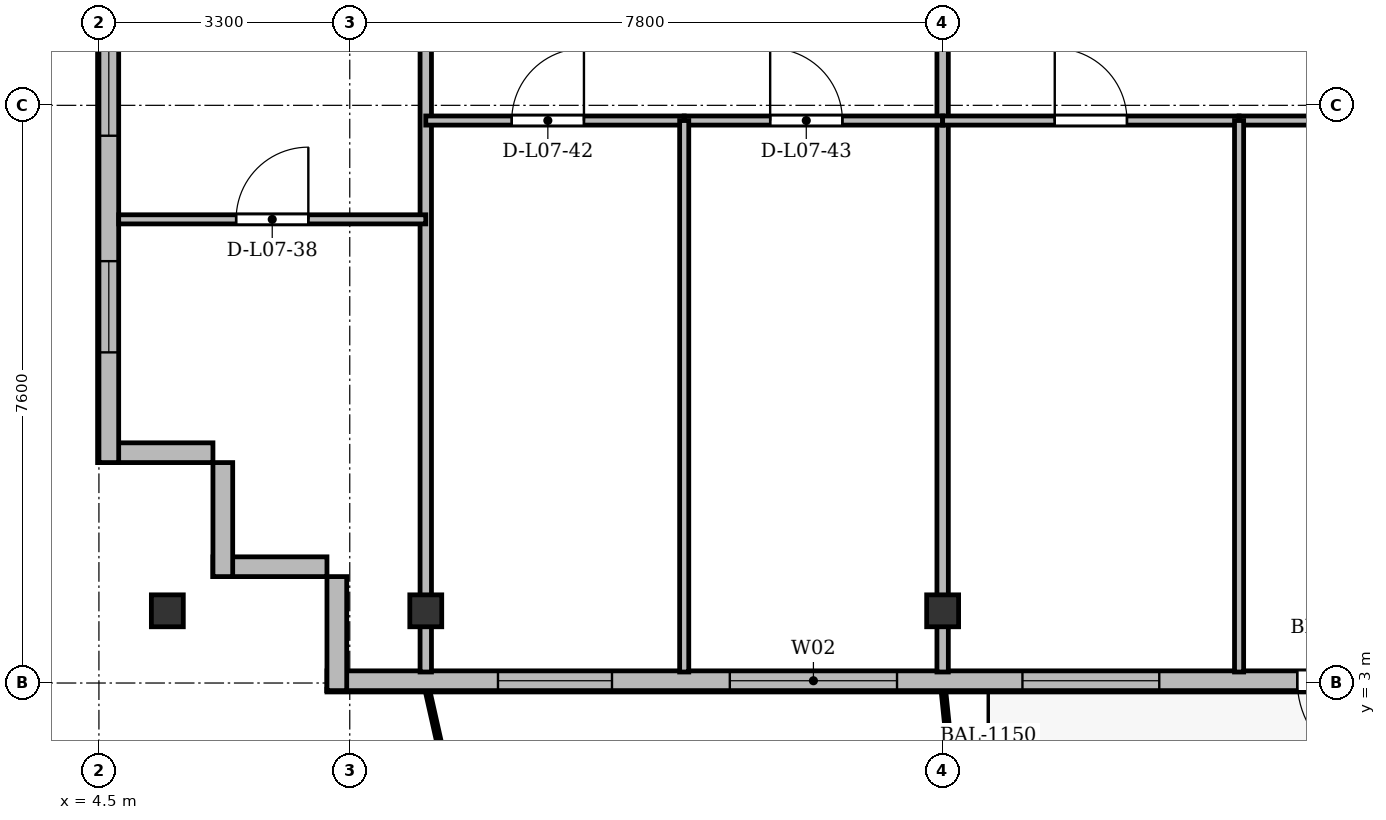
"""IFC4 building model, lengths in metres.
Left out: names, types, materials, properties, quantities, classifications, styles, units other than length and angle.
Written with IfcOpenShell. Run it as: python <this file> out.ifc"""

import sys

from ifc_helpers import new_model, si_unit, direction, frame, frame_2d, origin, origin_2d, place, context, subcontext, project, spatial, rectangle, i_section, extrude, source, transform, mapped, element, fill, save


model = new_model("IFC4")
c1 = context("Model", 3, precision=1e-05, world=origin(), true_north=direction((0.0, 1.0)))
c2 = subcontext(c1, "Body", "Model", "MODEL_VIEW")
j1 = project(units=[si_unit("LENGTHUNIT", "METRE"), si_unit("PLANEANGLEUNIT", "RADIAN")], contexts=[c1])
p1 = place(None, origin())
s1 = spatial("IfcSite", under=j1, at=p1, CompositionType="ELEMENT")
p2 = place(p1, origin())
s2 = spatial("IfcBuilding", under=s1, at=p2, CompositionType="ELEMENT")
p3 = place(p2, frame((0.0, 0.0, 30.7)))
s3 = spatial("IfcBuildingStorey", under=s2, at=p3, CompositionType="ELEMENT", Elevation=30.7)
m1 = source(origin(), c2, "Body", "SweptSolid", [
    extrude(i_section(OverallWidth=0.42, OverallDepth=0.42, WebThickness=0.026, FlangeThickness=0.04, at=origin_2d()), origin(), (0.0, 0.0, 1.0), 3.6),
])
for number, where, z_axis, x_axis in (
    (1, (5.4, 3.95, 0.0), (0.0, 0.0, 1.0), (1.0, 0.0, 0.0)),
    (2, (8.8, 3.95, 0.0), (0.0, 0.0, 1.0), (1.0, 0.0, 0.0)),
    (3, (15.6, 3.95, 0.0), (0.0, 0.0, 1.0), (1.0, 0.0, 0.0)),
):
    element("IfcColumn", number, at=place(p3, frame(where, z_axis=z_axis, x_axis=x_axis)), inside=s3, PredefinedType="COLUMN", context=c2, shape_type="MappedRepresentation", body=[
        mapped(m1, transform((0.0, 0.0, 0.0), x_axis=(1.0, 0.0, 0.0), y_axis=(0.0, 1.0, 0.0), z_axis=(0.0, 0.0, 1.0), scale=1.0)),
    ])
for number, where, z_axis, x_axis in (
    (4, (7.5, 4.53, 0.0), (0.0, 0.0, 1.0), (-1.0, 0.0, 0.0)),
    (5, (6.13, 4.4, 0.0), (0.0, 0.0, 1.0), (0.0, 1.0, 0.0)),
):
    element("IfcWall", number, at=place(p3, frame(where, z_axis=z_axis, x_axis=x_axis)), inside=s3, PredefinedType="SOLIDWALL", context=c2, shape_type="SweptSolid", body=[
        extrude(rectangle(XDim=1.5, YDim=0.26, at=frame_2d((0.75, 0.0))), origin(), (0.0, 0.0, 1.0), 3.34),
    ])
p4 = place(p3, frame((6.0, 6.03, 0.0), z_axis=(0.0, 0.0, 1.0), x_axis=(-1.0, 0.0, 0.0)))
e6 = element("IfcWall", 6, at=p4, inside=s3, PredefinedType="SOLIDWALL", context=c2, shape_type="SweptSolid", body=[
    extrude(rectangle(XDim=1.5, YDim=0.26, at=frame_2d((0.75, 0.0))), origin(), (0.0, 0.0, 1.0), 2.752),
])
p5 = place(p3, frame((4.63, 5.9, 0.0), z_axis=(0.0, 0.0, 1.0), x_axis=(0.0, 1.0, 0.0)))
e7 = element("IfcWall", 7, at=p5, inside=s3, PredefinedType="SOLIDWALL", context=c2, shape_type="SweptSolid", body=[
    extrude(rectangle(XDim=39.6, YDim=0.26, at=frame_2d((19.8, 0.0))), origin(), (0.0, 0.0, 1.0), 3.34),
])
p6 = place(p5, frame((1.45, 0.0, 0.92)))
e8 = element("IfcOpeningElement", 8, at=p6, cuts=e7, PredefinedType="OPENING", context=c2, shape_type="SweptSolid", body=[
    extrude(rectangle(XDim=1.2, YDim=1.65, at=frame_2d((0.6, 0.825))), frame((0.0, 0.14, 0.0), z_axis=(0.0, -1.0, 0.0), x_axis=(1.0, 0.0, 0.0)), (0.0, 0.0, 1.0), 0.28),
])
p7 = place(p5, frame((4.3, 0.0, 0.92)))
e9 = element("IfcOpeningElement", 9, at=p7, cuts=e7, PredefinedType="OPENING", context=c2, shape_type="SweptSolid", body=[
    extrude(rectangle(XDim=2.4, YDim=2.1, at=frame_2d((1.2, 1.05))), frame((0.0, 0.14, 0.0), z_axis=(0.0, -1.0, 0.0), x_axis=(1.0, 0.0, 0.0)), (0.0, 0.0, 1.0), 0.28),
])
p8 = place(p5, frame((8.5, 0.0, 0.92)))
e10 = element("IfcOpeningElement", 10, at=p8, cuts=e7, PredefinedType="OPENING", context=c2, shape_type="SweptSolid", body=[
    extrude(rectangle(XDim=2.4, YDim=2.1, at=frame_2d((1.2, 1.05))), frame((0.0, 0.14, 0.0), z_axis=(0.0, -1.0, 0.0), x_axis=(1.0, 0.0, 0.0)), (0.0, 0.0, 1.0), 0.28),
])
p9 = place(p5, frame((33.9, 0.0, 0.92)))
e11 = element("IfcOpeningElement", 11, at=p9, cuts=e7, PredefinedType="OPENING", context=c2, shape_type="SweptSolid", body=[
    extrude(rectangle(XDim=1.2, YDim=1.65, at=frame_2d((0.6, 0.825))), frame((0.0, 0.14, 0.0), z_axis=(0.0, -1.0, 0.0), x_axis=(1.0, 0.0, 0.0)), (0.0, 0.0, 1.0), 0.28),
])
p10 = place(p5, frame((37.25, 0.0, 0.92)))
e12 = element("IfcOpeningElement", 12, at=p10, cuts=e7, PredefinedType="OPENING", context=c2, shape_type="SweptSolid", body=[
    extrude(rectangle(XDim=1.2, YDim=1.65, at=frame_2d((0.6, 0.825))), frame((0.0, 0.14, 0.0), z_axis=(0.0, -1.0, 0.0), x_axis=(1.0, 0.0, 0.0)), (0.0, 0.0, 1.0), 0.28),
])
p11 = place(p3, frame((66.9, 3.03, 0.0), z_axis=(0.0, 0.0, 1.0), x_axis=(-1.0, 0.0, 0.0)))
e13 = element("IfcWall", 13, at=p11, inside=s3, PredefinedType="SOLIDWALL", context=c2, shape_type="SweptSolid", body=[
    extrude(rectangle(XDim=59.4, YDim=0.26, at=frame_2d((29.7, 0.0))), origin(), (0.0, 0.0, 1.0), 3.34),
])
p12 = place(p11, frame((3.7, 0.0, 0.9)))
e14 = element("IfcOpeningElement", 14, at=p12, cuts=e13, PredefinedType="OPENING", context=c2, shape_type="SweptSolid", body=[
    extrude(rectangle(XDim=2.0, YDim=1.95, at=frame_2d((1.0, 0.975))), frame((0.0, 0.14, 0.0), z_axis=(0.0, -1.0, 0.0), x_axis=(1.0, 0.0, 0.0)), (0.0, 0.0, 1.0), 0.28),
])
p13 = place(p11, frame((9.225, 0.0, 0.9)))
e15 = element("IfcOpeningElement", 15, at=p13, cuts=e13, PredefinedType="OPENING", context=c2, shape_type="SweptSolid", body=[
    extrude(rectangle(XDim=1.65, YDim=1.85, at=frame_2d((0.825, 0.925))), frame((0.0, 0.14, 0.0), z_axis=(0.0, -1.0, 0.0), x_axis=(1.0, 0.0, 0.0)), (0.0, 0.0, 1.0), 0.28),
])
p14 = place(p11, frame((13.05, 0.0, 0.9)))
e16 = element("IfcOpeningElement", 16, at=p14, cuts=e13, PredefinedType="OPENING", context=c2, shape_type="SweptSolid", body=[
    extrude(rectangle(XDim=1.8, YDim=1.8, at=frame_2d((0.9, 0.9))), frame((0.0, 0.14, 0.0), z_axis=(0.0, -1.0, 0.0), x_axis=(1.0, 0.0, 0.0)), (0.0, 0.0, 1.0), 0.28),
])
p15 = place(p11, frame((17.007, 0.0, 0.0)))
e17 = element("IfcOpeningElement", 17, at=p15, cuts=e13, PredefinedType="OPENING", context=c2, shape_type="SweptSolid", body=[
    extrude(rectangle(XDim=1.2, YDim=2.2, at=frame_2d((0.6, 1.1))), frame((0.0, 0.14, 0.0), z_axis=(0.0, -1.0, 0.0), x_axis=(1.0, 0.0, 0.0)), (0.0, 0.0, 1.0), 0.28),
])
p16 = place(p11, frame((20.55, 0.0, 0.9)))
e18 = element("IfcOpeningElement", 18, at=p16, cuts=e13, PredefinedType="OPENING", context=c2, shape_type="SweptSolid", body=[
    extrude(rectangle(XDim=1.5, YDim=1.75, at=frame_2d((0.75, 0.875))), frame((0.0, 0.14, 0.0), z_axis=(0.0, -1.0, 0.0), x_axis=(1.0, 0.0, 0.0)), (0.0, 0.0, 1.0), 0.28),
])
p17 = place(p11, frame((23.75, 0.0, 0.9)))
e19 = element("IfcOpeningElement", 19, at=p17, cuts=e13, PredefinedType="OPENING", context=c2, shape_type="SweptSolid", body=[
    extrude(rectangle(XDim=2.0, YDim=1.95, at=frame_2d((1.0, 0.975))), frame((0.0, 0.14, 0.0), z_axis=(0.0, -1.0, 0.0), x_axis=(1.0, 0.0, 0.0)), (0.0, 0.0, 1.0), 0.28),
])
p18 = place(p11, frame((27.225, 0.0, 0.9)))
e20 = element("IfcOpeningElement", 20, at=p18, cuts=e13, PredefinedType="OPENING", context=c2, shape_type="SweptSolid", body=[
    extrude(rectangle(XDim=1.65, YDim=1.85, at=frame_2d((0.825, 0.925))), frame((0.0, 0.14, 0.0), z_axis=(0.0, -1.0, 0.0), x_axis=(1.0, 0.0, 0.0)), (0.0, 0.0, 1.0), 0.28),
])
p19 = place(p11, frame((32.1, 0.0, 0.9)))
e21 = element("IfcOpeningElement", 21, at=p19, cuts=e13, PredefinedType="OPENING", context=c2, shape_type="SweptSolid", body=[
    extrude(rectangle(XDim=1.8, YDim=1.8, at=frame_2d((0.9, 0.9))), frame((0.0, 0.14, 0.0), z_axis=(0.0, -1.0, 0.0), x_axis=(1.0, 0.0, 0.0)), (0.0, 0.0, 1.0), 0.28),
])
p20 = place(p11, frame((36.75, 0.0, 0.9)))
e22 = element("IfcOpeningElement", 22, at=p20, cuts=e13, PredefinedType="OPENING", context=c2, shape_type="SweptSolid", body=[
    extrude(rectangle(XDim=1.5, YDim=1.75, at=frame_2d((0.75, 0.875))), frame((0.0, 0.14, 0.0), z_axis=(0.0, -1.0, 0.0), x_axis=(1.0, 0.0, 0.0)), (0.0, 0.0, 1.0), 0.28),
])
p21 = place(p11, frame((39.15, 0.0, 0.9)))
e23 = element("IfcOpeningElement", 23, at=p21, cuts=e13, PredefinedType="OPENING", context=c2, shape_type="SweptSolid", body=[
    extrude(rectangle(XDim=1.5, YDim=1.75, at=frame_2d((0.75, 0.875))), frame((0.0, 0.14, 0.0), z_axis=(0.0, -1.0, 0.0), x_axis=(1.0, 0.0, 0.0)), (0.0, 0.0, 1.0), 0.28),
])
p22 = place(p11, frame((41.3, 0.0, 0.9)))
e24 = element("IfcOpeningElement", 24, at=p22, cuts=e13, PredefinedType="OPENING", context=c2, shape_type="SweptSolid", body=[
    extrude(rectangle(XDim=2.0, YDim=1.95, at=frame_2d((1.0, 0.975))), frame((0.0, 0.14, 0.0), z_axis=(0.0, -1.0, 0.0), x_axis=(1.0, 0.0, 0.0)), (0.0, 0.0, 1.0), 0.28),
])
p23 = place(p11, frame((45.435, 0.0, 0.0)))
e25 = element("IfcOpeningElement", 25, at=p23, cuts=e13, PredefinedType="OPENING", context=c2, shape_type="SweptSolid", body=[
    extrude(rectangle(XDim=1.2, YDim=2.2, at=frame_2d((0.6, 1.1))), frame((0.0, 0.14, 0.0), z_axis=(0.0, -1.0, 0.0), x_axis=(1.0, 0.0, 0.0)), (0.0, 0.0, 1.0), 0.28),
])
p24 = place(p11, frame((48.45, 0.0, 0.9)))
e26 = element("IfcOpeningElement", 26, at=p24, cuts=e13, PredefinedType="OPENING", context=c2, shape_type="SweptSolid", body=[
    extrude(rectangle(XDim=1.8, YDim=1.8, at=frame_2d((0.9, 0.9))), frame((0.0, 0.14, 0.0), z_axis=(0.0, -1.0, 0.0), x_axis=(1.0, 0.0, 0.0)), (0.0, 0.0, 1.0), 0.28),
])
p25 = place(p11, frame((51.9, 0.0, 0.9)))
e27 = element("IfcOpeningElement", 27, at=p25, cuts=e13, PredefinedType="OPENING", context=c2, shape_type="SweptSolid", body=[
    extrude(rectangle(XDim=2.2, YDim=1.8, at=frame_2d((1.1, 0.9))), frame((0.0, 0.14, 0.0), z_axis=(0.0, -1.0, 0.0), x_axis=(1.0, 0.0, 0.0)), (0.0, 0.0, 1.0), 0.28),
])
p26 = place(p11, frame((55.65, 0.0, 0.9)))
e28 = element("IfcOpeningElement", 28, at=p26, cuts=e13, PredefinedType="OPENING", context=c2, shape_type="SweptSolid", body=[
    extrude(rectangle(XDim=1.5, YDim=1.75, at=frame_2d((0.75, 0.875))), frame((0.0, 0.14, 0.0), z_axis=(0.0, -1.0, 0.0), x_axis=(1.0, 0.0, 0.0)), (0.0, 0.0, 1.0), 0.28),
])
p27 = place(p3, frame((7.63, 2.9, 0.0), z_axis=(0.0, 0.0, 1.0), x_axis=(0.0, 1.0, 0.0)))
e29 = element("IfcWall", 29, at=p27, inside=s3, PredefinedType="SOLIDWALL", context=c2, shape_type="SweptSolid", body=[
    extrude(rectangle(XDim=1.5, YDim=0.26, at=frame_2d((0.75, 0.0))), origin(), (0.0, 0.0, 1.0), 2.69),
])
for number, where, z_axis, x_axis in (
    (30, (8.8, 3.145, 0.0), (0.0, 0.0, 1.0), (0.0, 1.0, 0.0)),
    (31, (15.6, 3.145, 0.0), (0.0, 0.0, 1.0), (0.0, 1.0, 0.0)),
):
    element("IfcWall", number, at=place(p3, frame(where, z_axis=z_axis, x_axis=x_axis)), inside=s3, PredefinedType="PARTITIONING", context=c2, shape_type="SweptSolid", body=[
        extrude(rectangle(XDim=24.455, YDim=0.15, at=frame_2d((12.228, 0.0))), origin(), (0.0, 0.0, 1.0), 2.752),
    ])
p28 = place(p3, frame((4.76, 9.1, 0.0), z_axis=(0.0, 0.0, 1.0), x_axis=(1.0, 0.0, 0.0)))
e32 = element("IfcWall", 32, at=p28, inside=s3, PredefinedType="PARTITIONING", context=c2, shape_type="SweptSolid", body=[
    extrude(rectangle(XDim=4.04, YDim=0.12, at=frame_2d((2.02, 0.0))), origin(), (0.0, 0.0, 1.0), 2.752),
])
p29 = place(p28, frame((1.545, 0.0, 0.0)))
e33 = element("IfcOpeningElement", 33, at=p29, cuts=e32, PredefinedType="OPENING", context=c2, shape_type="SweptSolid", body=[
    extrude(rectangle(XDim=0.95, YDim=2.15, at=frame_2d((0.475, 1.075))), frame((0.0, 0.07, 0.0), z_axis=(0.0, -1.0, 0.0), x_axis=(1.0, 0.0, 0.0)), (0.0, 0.0, 1.0), 0.14),
])
p30 = place(p3, frame((8.8, 10.4, 0.0), z_axis=(0.0, 0.0, 1.0), x_axis=(1.0, 0.0, 0.0)))
e34 = element("IfcWall", 34, at=p30, inside=s3, PredefinedType="PARTITIONING", context=c2, shape_type="SweptSolid", body=[
    extrude(rectangle(XDim=3.4, YDim=0.12, at=frame_2d((1.7, 0.0))), origin(), (0.0, 0.0, 1.0), 2.752),
])
p31 = place(p30, frame((1.131, 0.0, 0.0)))
e35 = element("IfcOpeningElement", 35, at=p31, cuts=e34, PredefinedType="OPENING", context=c2, shape_type="SweptSolid", body=[
    extrude(rectangle(XDim=0.95, YDim=2.15, at=frame_2d((0.475, 1.075))), frame((0.0, 0.07, 0.0), z_axis=(0.0, -1.0, 0.0), x_axis=(1.0, 0.0, 0.0)), (0.0, 0.0, 1.0), 0.14),
])
p32 = place(p3, frame((12.2, 10.4, 0.0), z_axis=(0.0, 0.0, 1.0), x_axis=(1.0, 0.0, 0.0)))
e36 = element("IfcWall", 36, at=p32, inside=s3, PredefinedType="PARTITIONING", context=c2, shape_type="SweptSolid", body=[
    extrude(rectangle(XDim=3.4, YDim=0.12, at=frame_2d((1.7, 0.0))), origin(), (0.0, 0.0, 1.0), 2.752),
])
p33 = place(p32, frame((1.131, 0.0, 0.0)))
e37 = element("IfcOpeningElement", 37, at=p33, cuts=e36, PredefinedType="OPENING", context=c2, shape_type="SweptSolid", body=[
    extrude(rectangle(XDim=0.95, YDim=2.15, at=frame_2d((0.475, 1.075))), frame((0.0, 0.07, 0.0), z_axis=(0.0, -1.0, 0.0), x_axis=(1.0, 0.0, 0.0)), (0.0, 0.0, 1.0), 0.14),
])
p34 = place(p3, frame((12.2, 3.145, 0.0), z_axis=(0.0, 0.0, 1.0), x_axis=(0.0, 1.0, 0.0)))
e38 = element("IfcWall", 38, at=p34, inside=s3, PredefinedType="PARTITIONING", context=c2, shape_type="SweptSolid", body=[
    extrude(rectangle(XDim=7.255, YDim=0.12, at=frame_2d((3.627, 0.0))), origin(), (0.0, 0.0, 1.0), 2.69),
])
p35 = place(p3, frame((15.6, 10.4, 0.0), z_axis=(0.0, 0.0, 1.0), x_axis=(1.0, 0.0, 0.0)))
e39 = element("IfcWall", 39, at=p35, inside=s3, PredefinedType="PARTITIONING", context=c2, shape_type="SweptSolid", body=[
    extrude(rectangle(XDim=3.9, YDim=0.12, at=frame_2d((1.95, 0.0))), origin(), (0.0, 0.0, 1.0), 2.752),
])
p36 = place(p35, frame((1.475, 0.0, 0.0)))
e40 = element("IfcOpeningElement", 40, at=p36, cuts=e39, PredefinedType="OPENING", context=c2, shape_type="SweptSolid", body=[
    extrude(rectangle(XDim=0.95, YDim=2.15, at=frame_2d((0.475, 1.075))), frame((0.0, 0.07, 0.0), z_axis=(0.0, -1.0, 0.0), x_axis=(1.0, 0.0, 0.0)), (0.0, 0.0, 1.0), 0.14),
])
p37 = place(p3, frame((19.5, 10.4, 0.0), z_axis=(0.0, 0.0, 1.0), x_axis=(1.0, 0.0, 0.0)))
e41 = element("IfcWall", 41, at=p37, inside=s3, PredefinedType="PARTITIONING", context=c2, shape_type="SweptSolid", body=[
    extrude(rectangle(XDim=3.9, YDim=0.12, at=frame_2d((1.95, 0.0))), origin(), (0.0, 0.0, 1.0), 2.752),
])
p38 = place(p37, frame((1.475, 0.0, 0.0)))
e42 = element("IfcOpeningElement", 42, at=p38, cuts=e41, PredefinedType="OPENING", context=c2, shape_type="SweptSolid", body=[
    extrude(rectangle(XDim=0.95, YDim=2.15, at=frame_2d((0.475, 1.075))), frame((0.0, 0.07, 0.0), z_axis=(0.0, -1.0, 0.0), x_axis=(1.0, 0.0, 0.0)), (0.0, 0.0, 1.0), 0.14),
])
p39 = place(p3, frame((19.5, 3.145, 0.0), z_axis=(0.0, 0.0, 1.0), x_axis=(0.0, 1.0, 0.0)))
e43 = element("IfcWall", 43, at=p39, inside=s3, PredefinedType="PARTITIONING", context=c2, shape_type="SweptSolid", body=[
    extrude(rectangle(XDim=7.255, YDim=0.12, at=frame_2d((3.627, 0.0))), origin(), (0.0, 0.0, 1.0), 2.69),
])
m2 = source(origin(), c2, "Body", "SweptSolid", [
    extrude(rectangle(XDim=1.2, YDim=1.65, at=frame_2d((0.6, 0.825))), frame((0.0, 0.03, 0.0), z_axis=(0.0, -1.0, 0.0), x_axis=(1.0, 0.0, 0.0)), (0.0, 0.0, 1.0), 0.06),
])
p40 = place(p6, origin())
e44 = element("IfcWindow", 44, at=p40, inside=s3, PartitioningType="SINGLE_PANEL", PredefinedType="WINDOW", context=c2, shape_type="MappedRepresentation", body=[
    mapped(m2, transform((0.0, 0.0, 0.0), x_axis=(1.0, 0.0, 0.0), y_axis=(0.0, 1.0, 0.0), z_axis=(0.0, 0.0, 1.0), scale=1.0)),
])
fill(e8, e44)
m3 = source(origin(), c2, "Body", "SweptSolid", [
    extrude(rectangle(XDim=2.4, YDim=2.1, at=frame_2d((1.2, 1.05))), frame((0.0, 0.03, 0.0), z_axis=(0.0, -1.0, 0.0), x_axis=(1.0, 0.0, 0.0)), (0.0, 0.0, 1.0), 0.06),
])
p41 = place(p7, origin())
e45 = element("IfcWindow", 45, at=p41, inside=s3, PartitioningType="SINGLE_PANEL", PredefinedType="WINDOW", context=c2, shape_type="MappedRepresentation", body=[
    mapped(m3, transform((0.0, 0.0, 0.0), x_axis=(1.0, 0.0, 0.0), y_axis=(0.0, 1.0, 0.0), z_axis=(0.0, 0.0, 1.0), scale=1.0)),
])
fill(e9, e45)
m4 = source(origin(), c2, "Body", "SweptSolid", [
    extrude(rectangle(XDim=1.2, YDim=2.2, at=frame_2d((0.6, 1.1))), frame((0.0, 0.025, 0.0), z_axis=(0.0, -1.0, 0.0), x_axis=(1.0, 0.0, 0.0)), (0.0, 0.0, 1.0), 0.05),
])
p42 = place(p23, origin())
e46 = element("IfcDoor", 46, at=p42, inside=s3, OperationType="SINGLE_SWING_LEFT", PredefinedType="DOOR", context=c2, shape_type="MappedRepresentation", body=[
    mapped(m4, transform((0.0, 0.0, 0.0), x_axis=(1.0, 0.0, 0.0), y_axis=(0.0, 1.0, 0.0), z_axis=(0.0, 0.0, 1.0), scale=1.0)),
])
fill(e25, e46)
m5 = source(origin(), c2, "Body", "SweptSolid", [
    extrude(rectangle(XDim=1.8, YDim=1.8, at=frame_2d((0.9, 0.9))), frame((0.0, 0.03, 0.0), z_axis=(0.0, -1.0, 0.0), x_axis=(1.0, 0.0, 0.0)), (0.0, 0.0, 1.0), 0.06),
])
p43 = place(p24, origin())
e47 = element("IfcWindow", 47, at=p43, inside=s3, PartitioningType="SINGLE_PANEL", PredefinedType="WINDOW", context=c2, shape_type="MappedRepresentation", body=[
    mapped(m5, transform((0.0, 0.0, 0.0), x_axis=(1.0, 0.0, 0.0), y_axis=(0.0, 1.0, 0.0), z_axis=(0.0, 0.0, 1.0), scale=1.0)),
])
fill(e26, e47)
m6 = source(origin(), c2, "Body", "SweptSolid", [
    extrude(rectangle(XDim=2.2, YDim=1.8, at=frame_2d((1.1, 0.9))), frame((0.0, 0.03, 0.0), z_axis=(0.0, -1.0, 0.0), x_axis=(1.0, 0.0, 0.0)), (0.0, 0.0, 1.0), 0.06),
])
p44 = place(p25, origin())
e48 = element("IfcWindow", 48, at=p44, inside=s3, PartitioningType="SINGLE_PANEL", PredefinedType="WINDOW", context=c2, shape_type="MappedRepresentation", body=[
    mapped(m6, transform((0.0, 0.0, 0.0), x_axis=(1.0, 0.0, 0.0), y_axis=(0.0, 1.0, 0.0), z_axis=(0.0, 0.0, 1.0), scale=1.0)),
])
fill(e27, e48)
m7 = source(origin(), c2, "Body", "SweptSolid", [
    extrude(rectangle(XDim=1.5, YDim=1.75, at=frame_2d((0.75, 0.875))), frame((0.0, 0.03, 0.0), z_axis=(0.0, -1.0, 0.0), x_axis=(1.0, 0.0, 0.0)), (0.0, 0.0, 1.0), 0.06),
])
p45 = place(p26, origin())
e49 = element("IfcWindow", 49, at=p45, inside=s3, PartitioningType="SINGLE_PANEL", PredefinedType="WINDOW", context=c2, shape_type="MappedRepresentation", body=[
    mapped(m7, transform((0.0, 0.0, 0.0), x_axis=(1.0, 0.0, 0.0), y_axis=(0.0, 1.0, 0.0), z_axis=(0.0, 0.0, 1.0), scale=1.0)),
])
fill(e28, e49)
m8 = source(origin(), c2, "Body", "SweptSolid", [
    extrude(rectangle(XDim=0.95, YDim=2.15, at=frame_2d((0.475, 1.075))), frame((0.0, 0.025, 0.0), z_axis=(0.0, -1.0, 0.0), x_axis=(1.0, 0.0, 0.0)), (0.0, 0.0, 1.0), 0.05),
])
p46 = place(p29, origin())
e50 = element("IfcDoor", 50, at=p46, inside=s3, OperationType="SINGLE_SWING_RIGHT", PredefinedType="DOOR", context=c2, shape_type="MappedRepresentation", body=[
    mapped(m8, transform((0.0, 0.0, 0.0), x_axis=(1.0, 0.0, 0.0), y_axis=(0.0, 1.0, 0.0), z_axis=(0.0, 0.0, 1.0), scale=1.0)),
])
fill(e33, e50)
p47 = place(p31, origin())
e51 = element("IfcDoor", 51, at=p47, inside=s3, OperationType="SINGLE_SWING_RIGHT", PredefinedType="DOOR", context=c2, shape_type="MappedRepresentation", body=[
    mapped(m8, transform((0.0, 0.0, 0.0), x_axis=(1.0, 0.0, 0.0), y_axis=(0.0, 1.0, 0.0), z_axis=(0.0, 0.0, 1.0), scale=1.0)),
])
fill(e35, e51)
p48 = place(p33, origin())
e52 = element("IfcDoor", 52, at=p48, inside=s3, OperationType="SINGLE_SWING_LEFT", PredefinedType="DOOR", context=c2, shape_type="MappedRepresentation", body=[
    mapped(m8, transform((0.0, 0.0, 0.0), x_axis=(1.0, 0.0, 0.0), y_axis=(0.0, 1.0, 0.0), z_axis=(0.0, 0.0, 1.0), scale=1.0)),
])
fill(e37, e52)
p49 = place(p36, origin())
e53 = element("IfcDoor", 53, at=p49, inside=s3, OperationType="SINGLE_SWING_LEFT", PredefinedType="DOOR", context=c2, shape_type="MappedRepresentation", body=[
    mapped(m8, transform((0.0, 0.0, 0.0), x_axis=(1.0, 0.0, 0.0), y_axis=(0.0, 1.0, 0.0), z_axis=(0.0, 0.0, 1.0), scale=1.0)),
])
fill(e40, e53)
save(model, sys.argv[1])
